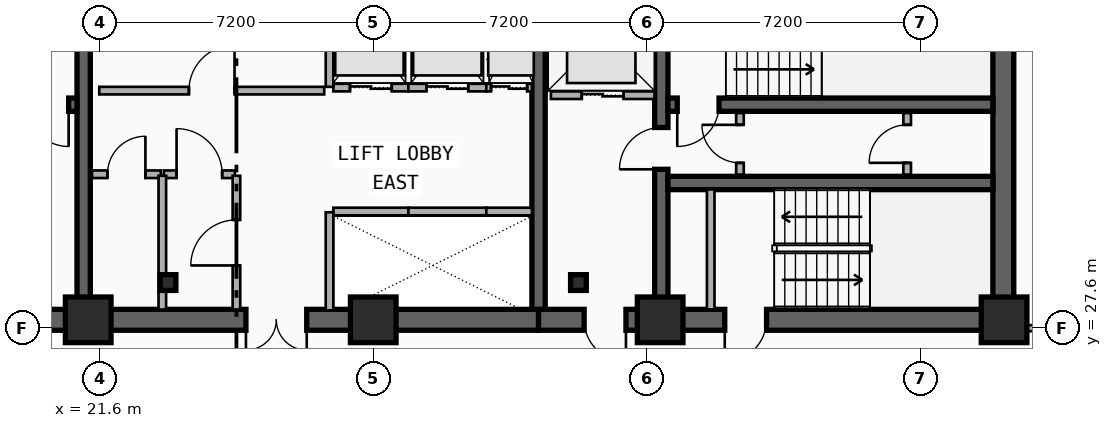
"""IFC4 building model, lengths in metres.
Left out: names, types, materials, properties, quantities, classifications, styles, units other than length and angle.
Written with IfcOpenShell. Run it as: python <this file> out.ifc"""

import sys

from ifc_helpers import new_model, si_unit, direction, frame, frame_2d, origin, origin_2d, place, context, subcontext, project, spatial, rectangle, i_section, extrude, element, fill, save


model = new_model("IFC4")
c1 = context("Model", 3, precision=1e-05, world=origin(), true_north=direction((0.0, 1.0)))
c2 = subcontext(c1, "Body", "Model", "MODEL_VIEW")
j1 = project(units=[si_unit("LENGTHUNIT", "METRE"), si_unit("PLANEANGLEUNIT", "RADIAN")], contexts=[c1])
p1 = place(None, origin())
s1 = spatial("IfcSite", under=j1, at=p1, CompositionType="ELEMENT")
p2 = place(p1, origin())
s2 = spatial("IfcBuilding", under=s1, at=p2, CompositionType="ELEMENT")
p3 = place(p2, frame((0.0, 0.0, 141.25)))
s3 = spatial("IfcBuildingStorey", under=s2, at=p3, CompositionType="ELEMENT", Elevation=141.25)
p4 = place(p3, frame((21.18, 27.82, 0.0), z_axis=(0.0, 0.0, 1.0), x_axis=(-1.0, 0.0, 0.0)))
e1 = element("IfcWall", 1, at=p4, inside=s3, PredefinedType="SHEAR", context=c2, shape_type="SweptSolid", body=[
    extrude(rectangle(XDim=9.03, YDim=0.55, at=frame_2d((4.515, 0.0))), origin(), (0.0, 0.0, 1.0), 3.55),
])
p5 = place(p4, frame((2.68, 0.0, 0.0)))
e2 = element("IfcOpeningElement", 2, at=p5, cuts=e1, PredefinedType="OPENING", context=c2, shape_type="SweptSolid", body=[
    extrude(rectangle(XDim=1.1, YDim=2.15, at=frame_2d((0.55, 1.075))), frame((0.0, 0.285, 0.0), z_axis=(0.0, -1.0, 0.0), x_axis=(1.0, 0.0, 0.0)), (0.0, 0.0, 1.0), 0.57),
])
p6 = place(p3, frame((33.15, 27.82, 0.0), z_axis=(0.0, 0.0, 1.0), x_axis=(-1.0, 0.0, 0.0)))
e3 = element("IfcWall", 3, at=p6, inside=s3, PredefinedType="SHEAR", context=c2, shape_type="SweptSolid", body=[
    extrude(rectangle(XDim=11.97, YDim=0.55, at=frame_2d((5.985, 0.0))), origin(), (0.0, 0.0, 1.0), 3.55),
])
p7 = place(p6, frame((6.1, 0.0, 0.0)))
e4 = element("IfcOpeningElement", 4, at=p7, cuts=e3, PredefinedType="OPENING", context=c2, shape_type="SweptSolid", body=[
    extrude(rectangle(XDim=1.6, YDim=2.2, at=frame_2d((0.8, 1.1))), frame((0.0, 0.285, 0.0), z_axis=(0.0, -1.0, 0.0), x_axis=(1.0, 0.0, 0.0)), (0.0, 0.0, 1.0), 0.57),
])
p8 = place(p3, frame((45.38, 27.82, 0.0), z_axis=(0.0, 0.0, 1.0), x_axis=(-1.0, 0.0, 0.0)))
e5 = element("IfcWall", 5, at=p8, inside=s3, PredefinedType="SHEAR", context=c2, shape_type="SweptSolid", body=[
    extrude(rectangle(XDim=12.23, YDim=0.55, at=frame_2d((6.115, 0.0))), origin(), (0.0, 0.0, 1.0), 3.55),
])
p9 = place(p8, frame((9.93, 0.0, 0.0)))
e6 = element("IfcOpeningElement", 6, at=p9, cuts=e5, PredefinedType="OPENING", context=c2, shape_type="SweptSolid", body=[
    extrude(rectangle(XDim=1.1, YDim=2.15, at=frame_2d((0.55, 1.075))), frame((0.0, 0.285, 0.0), z_axis=(0.0, -1.0, 0.0), x_axis=(1.0, 0.0, 0.0)), (0.0, 0.0, 1.0), 0.57),
])
p10 = place(p8, frame((6.23, 0.0, 0.0)))
e7 = element("IfcOpeningElement", 7, at=p10, cuts=e5, PredefinedType="OPENING", context=c2, shape_type="SweptSolid", body=[
    extrude(rectangle(XDim=1.1, YDim=2.15, at=frame_2d((0.55, 1.075))), frame((0.0, 0.285, 0.0), z_axis=(0.0, -1.0, 0.0), x_axis=(1.0, 0.0, 0.0)), (0.0, 0.0, 1.0), 0.57),
])
p11 = place(p3, frame((45.38, 28.095, 0.0), z_axis=(0.0, 0.0, 1.0), x_axis=(0.0, 1.0, 0.0)))
e8 = element("IfcWall", 8, at=p11, inside=s3, PredefinedType="SHEAR", context=c2, shape_type="SweptSolid", body=[
    extrude(rectangle(XDim=8.68, YDim=0.55, at=frame_2d((4.34, 0.0))), origin(), (0.0, 0.0, 1.0), 3.55),
])
for number, where, z_axis, x_axis in (
    (9, (21.18, 28.095, 0.0), (0.0, 0.0, 1.0), (0.0, 1.0, 0.0)),
    (10, (33.15, 28.095, 0.0), (0.0, 0.0, 1.0), (0.0, 1.0, 0.0)),
):
    element("IfcWall", number, at=place(p3, frame(where, z_axis=z_axis, x_axis=x_axis)), inside=s3, PredefinedType="SHEAR", context=c2, shape_type="SweptSolid", body=[
        extrude(rectangle(XDim=8.68, YDim=0.35, at=frame_2d((4.34, 0.0))), origin(), (0.0, 0.0, 1.0), 3.55),
    ])
p12 = place(p3, frame((36.38, 28.095, 0.0), z_axis=(0.0, 0.0, 1.0), x_axis=(0.0, 1.0, 0.0)))
e11 = element("IfcWall", 11, at=p12, inside=s3, PredefinedType="SHEAR", context=c2, shape_type="SweptSolid", body=[
    extrude(rectangle(XDim=8.68, YDim=0.35, at=frame_2d((4.34, 0.0))), origin(), (0.0, 0.0, 1.0), 3.55),
])
p13 = place(p12, frame((3.685, 0.0, 0.0)))
e12 = element("IfcOpeningElement", 12, at=p13, cuts=e11, PredefinedType="OPENING", context=c2, shape_type="SweptSolid", body=[
    extrude(rectangle(XDim=1.1, YDim=2.15, at=frame_2d((0.55, 1.075))), frame((0.0, 0.185, 0.0), z_axis=(0.0, -1.0, 0.0), x_axis=(1.0, 0.0, 0.0)), (0.0, 0.0, 1.0), 0.37),
])
p14 = place(p3, frame((21.005, 33.48, 0.0), z_axis=(0.0, 0.0, 1.0), x_axis=(-1.0, 0.0, 0.0)))
e13 = element("IfcWall", 13, at=p14, inside=s3, PredefinedType="SHEAR", context=c2, shape_type="SweptSolid", body=[
    extrude(rectangle(XDim=8.58, YDim=0.35, at=frame_2d((4.29, 0.0))), origin(), (0.0, 0.0, 1.0), 3.55),
])
p15 = place(p14, frame((0.22, 0.0, 0.0)))
e14 = element("IfcOpeningElement", 14, at=p15, cuts=e13, PredefinedType="OPENING", context=c2, shape_type="SweptSolid", body=[
    extrude(rectangle(XDim=1.1, YDim=2.15, at=frame_2d((0.55, 1.075))), frame((0.0, 0.185, 0.0), z_axis=(0.0, -1.0, 0.0), x_axis=(1.0, 0.0, 0.0)), (0.0, 0.0, 1.0), 0.37),
])
p16 = place(p3, frame((45.105, 33.48, 0.0), z_axis=(0.0, 0.0, 1.0), x_axis=(-1.0, 0.0, 0.0)))
e15 = element("IfcWall", 15, at=p16, inside=s3, PredefinedType="SHEAR", context=c2, shape_type="SweptSolid", body=[
    extrude(rectangle(XDim=8.55, YDim=0.35, at=frame_2d((4.275, 0.0))), origin(), (0.0, 0.0, 1.0), 3.55),
])
p17 = place(p16, frame((7.205, 0.0, 0.0)))
e16 = element("IfcOpeningElement", 16, at=p17, cuts=e15, PredefinedType="OPENING", context=c2, shape_type="SweptSolid", body=[
    extrude(rectangle(XDim=1.1, YDim=2.15, at=frame_2d((0.55, 1.075))), frame((0.0, 0.185, 0.0), z_axis=(0.0, -1.0, 0.0), x_axis=(1.0, 0.0, 0.0)), (0.0, 0.0, 1.0), 0.37),
])
p18 = place(p3, frame((36.555, 31.42, 0.0), z_axis=(0.0, 0.0, 1.0), x_axis=(1.0, 0.0, 0.0)))
e17 = element("IfcWall", 17, at=p18, inside=s3, PredefinedType="SHEAR", context=c2, shape_type="SweptSolid", body=[
    extrude(rectangle(XDim=8.55, YDim=0.35, at=frame_2d((4.275, 0.0))), origin(), (0.0, 0.0, 1.0), 3.55),
])
for number, where, z_axis, x_axis in (
    (18, (23.4, 28.8, 0.0), (0.0, 0.0, 1.0), (1.0, 0.0, 0.0)),
    (19, (34.2, 28.8, 0.0), (0.0, 0.0, 1.0), (1.0, 0.0, 0.0)),
):
    element("IfcColumn", number, at=place(p3, frame(where, z_axis=z_axis, x_axis=x_axis)), inside=s3, PredefinedType="COLUMN", context=c2, shape_type="SweptSolid", body=[
        extrude(i_section(OverallWidth=0.413, OverallDepth=0.415, WebThickness=0.03, FlangeThickness=0.047, FilletRadius=0.015, at=origin_2d()), origin(), (0.0, 0.0, 1.0), 3.55),
    ])
for number, where, z_axis, x_axis in (
    (20, (21.3, 27.82, 0.0), (0.0, 0.0, 1.0), (1.0, 0.0, 0.0)),
    (21, (28.8, 27.82, 0.0), (0.0, 0.0, 1.0), (1.0, 0.0, 0.0)),
    (22, (36.35, 27.82, 0.0), (0.0, 0.0, 1.0), (1.0, 0.0, 0.0)),
    (23, (45.4, 27.82, 0.0), (0.0, 0.0, 1.0), (1.0, 0.0, 0.0)),
):
    element("IfcColumn", number, at=place(p3, frame(where, z_axis=z_axis, x_axis=x_axis)), inside=s3, PredefinedType="COLUMN", context=c2, shape_type="SweptSolid", body=[
        extrude(rectangle(XDim=1.2, YDim=1.2, at=origin_2d()), origin(), (0.0, 0.0, 1.0), 3.55),
    ])
p19 = place(p3, frame((33.475, 33.73, 0.0), z_axis=(0.0, 0.0, 1.0), x_axis=(1.0, 0.0, 0.0)))
e24 = element("IfcWall", 24, at=p19, inside=s3, PredefinedType="PARTITIONING", context=c2, shape_type="SweptSolid", body=[
    extrude(rectangle(XDim=2.725, YDim=0.2, at=frame_2d((1.362, 0.0))), origin(), (0.0, 0.0, 1.0), 2.36),
])
p20 = place(p19, frame((0.812, 0.0, 0.0)))
e25 = element("IfcOpeningElement", 25, at=p20, cuts=e24, PredefinedType="OPENING", context=c2, shape_type="SweptSolid", body=[
    extrude(rectangle(XDim=1.1, YDim=2.15, at=frame_2d((0.55, 1.075))), frame((0.0, 0.11, 0.0), z_axis=(0.0, -1.0, 0.0), x_axis=(1.0, 0.0, 0.0)), (0.0, 0.0, 1.0), 0.22),
])
p21 = place(p3, frame((27.75, 30.67, 0.0), z_axis=(0.0, 0.0, 1.0), x_axis=(1.0, 0.0, 0.0)))
e26 = element("IfcWall", 26, at=p21, inside=s3, PredefinedType="PARTITIONING", context=c2, shape_type="SweptSolid", body=[
    extrude(rectangle(XDim=1.975, YDim=0.2, at=frame_2d((0.988, 0.0))), origin(), (0.0, 0.0, 1.0), 2.36),
])
p22 = place(p3, frame((27.65, 28.07, 0.0), z_axis=(0.0, 0.0, 1.0), x_axis=(0.0, 1.0, 0.0)))
e27 = element("IfcWall", 27, at=p22, inside=s3, PredefinedType="PARTITIONING", context=c2, shape_type="SweptSolid", body=[
    extrude(rectangle(XDim=2.58, YDim=0.2, at=frame_2d((1.29, 0.0))), origin(), (0.0, 0.0, 1.0), 2.36),
])
p23 = place(p3, frame((29.725, 30.67, 0.0), z_axis=(0.0, 0.0, 1.0), x_axis=(1.0, 0.0, 0.0)))
e28 = element("IfcWall", 28, at=p23, inside=s3, PredefinedType="PARTITIONING", context=c2, shape_type="SweptSolid", body=[
    extrude(rectangle(XDim=2.05, YDim=0.2, at=frame_2d((1.025, 0.0))), origin(), (0.0, 0.0, 1.0), 2.67),
])
p24 = place(p3, frame((31.775, 30.67, 0.0), z_axis=(0.0, 0.0, 1.0), x_axis=(1.0, 0.0, 0.0)))
e29 = element("IfcWall", 29, at=p24, inside=s3, PredefinedType="PARTITIONING", context=c2, shape_type="SweptSolid", body=[
    extrude(rectangle(XDim=1.2, YDim=0.2, at=frame_2d((0.6, 0.0))), origin(), (0.0, 0.0, 1.0), 2.67),
])
p25 = place(p3, frame((27.75, 33.93, 0.0), z_axis=(0.0, 0.0, 1.0), x_axis=(1.0, 0.0, 0.0)))
e30 = element("IfcWall", 30, at=p25, inside=s3, PredefinedType="PARTITIONING", context=c2, shape_type="SweptSolid", body=[
    extrude(rectangle(XDim=1.975, YDim=0.2, at=frame_2d((0.988, 0.0))), origin(), (0.0, 0.0, 1.0), 2.36),
])
p26 = place(p25, frame((0.438, 0.0, 0.0)))
e31 = element("IfcOpeningElement", 31, at=p26, cuts=e30, PredefinedType="OPENING", context=c2, shape_type="SweptSolid", body=[
    extrude(rectangle(XDim=1.1, YDim=2.15, at=frame_2d((0.55, 1.075))), frame((0.0, 0.11, 0.0), z_axis=(0.0, -1.0, 0.0), x_axis=(1.0, 0.0, 0.0)), (0.0, 0.0, 1.0), 0.22),
])
p27 = place(p3, frame((27.65, 33.95, 0.0), z_axis=(0.0, 0.0, 1.0), x_axis=(0.0, 1.0, 0.0)))
e32 = element("IfcWall", 32, at=p27, inside=s3, PredefinedType="PARTITIONING", context=c2, shape_type="SweptSolid", body=[
    extrude(rectangle(XDim=2.68, YDim=0.2, at=frame_2d((1.34, 0.0))), origin(), (0.0, 0.0, 1.0), 2.36),
])
p28 = place(p3, frame((29.725, 33.93, 0.0), z_axis=(0.0, 0.0, 1.0), x_axis=(1.0, 0.0, 0.0)))
e33 = element("IfcWall", 33, at=p28, inside=s3, PredefinedType="PARTITIONING", context=c2, shape_type="SweptSolid", body=[
    extrude(rectangle(XDim=2.05, YDim=0.2, at=frame_2d((1.025, 0.0))), origin(), (0.0, 0.0, 1.0), 3.29),
])
p29 = place(p28, frame((0.475, 0.0, 0.0)))
e34 = element("IfcOpeningElement", 34, at=p29, cuts=e33, PredefinedType="OPENING", context=c2, shape_type="SweptSolid", body=[
    extrude(rectangle(XDim=1.1, YDim=2.15, at=frame_2d((0.55, 1.075))), frame((0.0, 0.11, 0.0), z_axis=(0.0, -1.0, 0.0), x_axis=(1.0, 0.0, 0.0)), (0.0, 0.0, 1.0), 0.22),
])
p30 = place(p3, frame((31.775, 33.93, 0.0), z_axis=(0.0, 0.0, 1.0), x_axis=(1.0, 0.0, 0.0)))
e35 = element("IfcWall", 35, at=p30, inside=s3, PredefinedType="PARTITIONING", context=c2, shape_type="SweptSolid", body=[
    extrude(rectangle(XDim=1.2, YDim=0.2, at=frame_2d((0.6, 0.0))), origin(), (0.0, 0.0, 1.0), 3.29),
])
p31 = place(p30, frame((0.125, 0.0, 0.0)))
e36 = element("IfcOpeningElement", 36, at=p31, cuts=e35, PredefinedType="OPENING", context=c2, shape_type="SweptSolid", body=[
    extrude(rectangle(XDim=0.95, YDim=2.15, at=frame_2d((0.475, 1.075))), frame((0.0, 0.11, 0.0), z_axis=(0.0, -1.0, 0.0), x_axis=(1.0, 0.0, 0.0)), (0.0, 0.0, 1.0), 0.22),
])
p32 = place(p3, frame((37.68, 28.095, 0.0), z_axis=(0.0, 0.0, 1.0), x_axis=(0.0, 1.0, 0.0)))
e37 = element("IfcWall", 37, at=p32, inside=s3, PredefinedType="PARTITIONING", context=c2, shape_type="SweptSolid", body=[
    extrude(rectangle(XDim=3.155, YDim=0.2, at=frame_2d((1.578, 0.0))), origin(), (0.0, 0.0, 1.0), 2.67),
])
p33 = place(p3, frame((38.45, 31.64, 0.0), z_axis=(0.0, 0.0, 1.0), x_axis=(0.0, 1.0, 0.0)))
e38 = element("IfcWall", 38, at=p33, inside=s3, PredefinedType="PARTITIONING", context=c2, shape_type="SweptSolid", body=[
    extrude(rectangle(XDim=1.62, YDim=0.2, at=frame_2d((0.81, 0.0))), origin(), (0.0, 0.0, 1.0), 3.29),
])
p34 = place(p33, frame((0.31, 0.0, 0.0)))
e39 = element("IfcOpeningElement", 39, at=p34, cuts=e38, PredefinedType="OPENING", context=c2, shape_type="SweptSolid", body=[
    extrude(rectangle(XDim=1.0, YDim=2.15, at=frame_2d((0.5, 1.075))), frame((0.0, 0.11, 0.0), z_axis=(0.0, -1.0, 0.0), x_axis=(1.0, 0.0, 0.0)), (0.0, 0.0, 1.0), 0.22),
])
p35 = place(p3, frame((42.85, 31.64, 0.0), z_axis=(0.0, 0.0, 1.0), x_axis=(0.0, 1.0, 0.0)))
e40 = element("IfcWall", 40, at=p35, inside=s3, PredefinedType="PARTITIONING", context=c2, shape_type="SweptSolid", body=[
    extrude(rectangle(XDim=1.62, YDim=0.2, at=frame_2d((0.81, 0.0))), origin(), (0.0, 0.0, 1.0), 3.29),
])
p36 = place(p35, frame((0.31, 0.0, 0.0)))
e41 = element("IfcOpeningElement", 41, at=p36, cuts=e40, PredefinedType="OPENING", context=c2, shape_type="SweptSolid", body=[
    extrude(rectangle(XDim=1.0, YDim=2.15, at=frame_2d((0.5, 1.075))), frame((0.0, 0.11, 0.0), z_axis=(0.0, -1.0, 0.0), x_axis=(1.0, 0.0, 0.0)), (0.0, 0.0, 1.0), 0.22),
])
p37 = place(p3, frame((21.4, 31.65, 0.0), z_axis=(0.0, 0.0, 1.0), x_axis=(1.0, 0.0, 0.0)))
e42 = element("IfcWall", 42, at=p37, inside=s3, PredefinedType="PARTITIONING", context=c2, shape_type="SweptSolid", body=[
    extrude(rectangle(XDim=1.81, YDim=0.2, at=frame_2d((0.905, 0.0))), origin(), (0.0, 0.0, 1.0), 2.36),
])
p38 = place(p37, frame((0.405, 0.0, 0.0)))
e43 = element("IfcOpeningElement", 43, at=p38, cuts=e42, PredefinedType="OPENING", context=c2, shape_type="SweptSolid", body=[
    extrude(rectangle(XDim=1.0, YDim=2.15, at=frame_2d((0.5, 1.075))), frame((0.0, 0.11, 0.0), z_axis=(0.0, -1.0, 0.0), x_axis=(1.0, 0.0, 0.0)), (0.0, 0.0, 1.0), 0.22),
])
p39 = place(p3, frame((23.29, 31.65, 0.0), z_axis=(0.0, 0.0, 1.0), x_axis=(1.0, 0.0, 0.0)))
e44 = element("IfcWall", 44, at=p39, inside=s3, PredefinedType="PARTITIONING", context=c2, shape_type="SweptSolid", body=[
    extrude(rectangle(XDim=1.87, YDim=0.2, at=frame_2d((0.935, 0.0))), origin(), (0.0, 0.0, 1.0), 3.29),
])
p40 = place(p39, frame((0.335, 0.0, 0.0)))
e45 = element("IfcOpeningElement", 45, at=p40, cuts=e44, PredefinedType="OPENING", context=c2, shape_type="SweptSolid", body=[
    extrude(rectangle(XDim=1.2, YDim=2.15, at=frame_2d((0.6, 1.075))), frame((0.0, 0.11, 0.0), z_axis=(0.0, -1.0, 0.0), x_axis=(1.0, 0.0, 0.0)), (0.0, 0.0, 1.0), 0.22),
])
p41 = place(p3, frame((21.59, 33.85, 0.0), z_axis=(0.0, 0.0, 1.0), x_axis=(1.0, 0.0, 0.0)))
e46 = element("IfcWall", 46, at=p41, inside=s3, PredefinedType="PARTITIONING", context=c2, shape_type="SweptSolid", body=[
    extrude(rectangle(XDim=5.92, YDim=0.2, at=frame_2d((2.96, 0.0))), origin(), (0.0, 0.0, 1.0), 2.36),
])
p42 = place(p41, frame((2.36, 0.0, 0.0)))
e47 = element("IfcOpeningElement", 47, at=p42, cuts=e46, PredefinedType="OPENING", context=c2, shape_type="SweptSolid", body=[
    extrude(rectangle(XDim=1.2, YDim=2.15, at=frame_2d((0.6, 1.075))), frame((0.0, 0.11, 0.0), z_axis=(0.0, -1.0, 0.0), x_axis=(1.0, 0.0, 0.0)), (0.0, 0.0, 1.0), 0.22),
])
p43 = place(p3, frame((25.2, 28.09, 0.0), z_axis=(0.0, 0.0, 1.0), x_axis=(0.0, 1.0, 0.0)))
e48 = element("IfcWall", 48, at=p43, inside=s3, PredefinedType="PARTITIONING", context=c2, shape_type="SweptSolid", body=[
    extrude(rectangle(XDim=3.52, YDim=0.2, at=frame_2d((1.76, 0.0))), origin(), (0.0, 0.0, 1.0), 2.67),
])
p44 = place(p43, frame((1.16, 0.0, 0.0)))
e49 = element("IfcOpeningElement", 49, at=p44, cuts=e48, PredefinedType="OPENING", context=c2, shape_type="SweptSolid", body=[
    extrude(rectangle(XDim=1.2, YDim=2.15, at=frame_2d((0.6, 1.075))), frame((0.0, 0.11, 0.0), z_axis=(0.0, -1.0, 0.0), x_axis=(1.0, 0.0, 0.0)), (0.0, 0.0, 1.0), 0.22),
])
p45 = place(p3, frame((23.25, 28.09, 0.0), z_axis=(0.0, 0.0, 1.0), x_axis=(0.0, 1.0, 0.0)))
e50 = element("IfcWall", 50, at=p45, inside=s3, PredefinedType="PARTITIONING", context=c2, shape_type="SweptSolid", body=[
    extrude(rectangle(XDim=3.52, YDim=0.2, at=frame_2d((1.76, 0.0))), origin(), (0.0, 0.0, 1.0), 2.67),
])
p46 = place(p3, frame((45.41, 27.6, 0.0), z_axis=(0.0, 0.0, 1.0), x_axis=(1.0, 0.0, 0.0)))
e51 = element("IfcWall", 51, at=p46, inside=s3, PredefinedType="PARTITIONING", context=c2, shape_type="SweptSolid", body=[
    extrude(rectangle(XDim=0.91, YDim=0.16, at=frame_2d((0.455, 0.0))), origin(), (0.0, 0.0, 1.0), 2.36),
])
p47 = place(p20, origin())
e52 = element("IfcDoor", 52, at=p47, inside=s3, OperationType="DOUBLE_DOOR_SLIDING", PredefinedType="DOOR", context=c2, shape_type="SweptSolid", body=[
    extrude(rectangle(XDim=1.1, YDim=2.15, at=frame_2d((0.55, 1.075))), frame((0.0, 0.025, 0.0), z_axis=(0.0, -1.0, 0.0), x_axis=(1.0, 0.0, 0.0)), (0.0, 0.0, 1.0), 0.05),
])
fill(e25, e52)
p48 = place(p26, origin())
e53 = element("IfcDoor", 53, at=p48, inside=s3, OperationType="DOUBLE_DOOR_SLIDING", PredefinedType="DOOR", context=c2, shape_type="SweptSolid", body=[
    extrude(rectangle(XDim=1.1, YDim=2.15, at=frame_2d((0.55, 1.075))), frame((0.0, 0.025, 0.0), z_axis=(0.0, -1.0, 0.0), x_axis=(1.0, 0.0, 0.0)), (0.0, 0.0, 1.0), 0.05),
])
fill(e31, e53)
p49 = place(p29, origin())
e54 = element("IfcDoor", 54, at=p49, inside=s3, OperationType="DOUBLE_DOOR_SLIDING", PredefinedType="DOOR", context=c2, shape_type="SweptSolid", body=[
    extrude(rectangle(XDim=1.1, YDim=2.15, at=frame_2d((0.55, 1.075))), frame((0.0, 0.025, 0.0), z_axis=(0.0, -1.0, 0.0), x_axis=(1.0, 0.0, 0.0)), (0.0, 0.0, 1.0), 0.05),
])
fill(e34, e54)
p50 = place(p31, origin())
e55 = element("IfcDoor", 55, at=p50, inside=s3, OperationType="DOUBLE_DOOR_SLIDING", PredefinedType="DOOR", context=c2, shape_type="SweptSolid", body=[
    extrude(rectangle(XDim=0.95, YDim=2.15, at=frame_2d((0.475, 1.075))), frame((0.0, 0.025, 0.0), z_axis=(0.0, -1.0, 0.0), x_axis=(1.0, 0.0, 0.0)), (0.0, 0.0, 1.0), 0.05),
])
fill(e36, e55)
p51 = place(p15, origin())
e56 = element("IfcDoor", 56, at=p51, inside=s3, OperationType="SINGLE_SWING_LEFT", PredefinedType="DOOR", context=c2, shape_type="SweptSolid", body=[
    extrude(rectangle(XDim=1.1, YDim=2.15, at=frame_2d((0.55, 1.075))), frame((0.0, 0.025, 0.0), z_axis=(0.0, -1.0, 0.0), x_axis=(1.0, 0.0, 0.0)), (0.0, 0.0, 1.0), 0.05),
])
fill(e14, e56)
p52 = place(p17, origin())
e57 = element("IfcDoor", 57, at=p52, inside=s3, OperationType="SINGLE_SWING_RIGHT", PredefinedType="DOOR", context=c2, shape_type="SweptSolid", body=[
    extrude(rectangle(XDim=1.1, YDim=2.15, at=frame_2d((0.55, 1.075))), frame((0.0, 0.025, 0.0), z_axis=(0.0, -1.0, 0.0), x_axis=(1.0, 0.0, 0.0)), (0.0, 0.0, 1.0), 0.05),
])
fill(e16, e57)
p53 = place(p13, origin())
e58 = element("IfcDoor", 58, at=p53, inside=s3, OperationType="SINGLE_SWING_LEFT", PredefinedType="DOOR", context=c2, shape_type="SweptSolid", body=[
    extrude(rectangle(XDim=1.1, YDim=2.15, at=frame_2d((0.55, 1.075))), frame((0.0, 0.025, 0.0), z_axis=(0.0, -1.0, 0.0), x_axis=(1.0, 0.0, 0.0)), (0.0, 0.0, 1.0), 0.05),
])
fill(e12, e58)
p54 = place(p9, origin())
e59 = element("IfcDoor", 59, at=p54, inside=s3, OperationType="SINGLE_SWING_LEFT", PredefinedType="DOOR", context=c2, shape_type="SweptSolid", body=[
    extrude(rectangle(XDim=1.1, YDim=2.15, at=frame_2d((0.55, 1.075))), frame((0.0, 0.025, 0.0), z_axis=(0.0, -1.0, 0.0), x_axis=(1.0, 0.0, 0.0)), (0.0, 0.0, 1.0), 0.05),
])
fill(e6, e59)
p55 = place(p10, origin())
e60 = element("IfcDoor", 60, at=p55, inside=s3, OperationType="SINGLE_SWING_RIGHT", PredefinedType="DOOR", context=c2, shape_type="SweptSolid", body=[
    extrude(rectangle(XDim=1.1, YDim=2.15, at=frame_2d((0.55, 1.075))), frame((0.0, 0.025, 0.0), z_axis=(0.0, -1.0, 0.0), x_axis=(1.0, 0.0, 0.0)), (0.0, 0.0, 1.0), 0.05),
])
fill(e7, e60)
p56 = place(p7, origin())
e61 = element("IfcDoor", 61, at=p56, inside=s3, OperationType="SINGLE_SWING_LEFT", PredefinedType="DOOR", context=c2, shape_type="SweptSolid", body=[
    extrude(rectangle(XDim=1.6, YDim=2.2, at=frame_2d((0.8, 1.1))), frame((0.0, 0.025, 0.0), z_axis=(0.0, -1.0, 0.0), x_axis=(1.0, 0.0, 0.0)), (0.0, 0.0, 1.0), 0.05),
])
fill(e4, e61)
p57 = place(p34, origin())
e62 = element("IfcDoor", 62, at=p57, inside=s3, OperationType="SINGLE_SWING_RIGHT", PredefinedType="DOOR", context=c2, shape_type="SweptSolid", body=[
    extrude(rectangle(XDim=1.0, YDim=2.15, at=frame_2d((0.5, 1.075))), frame((0.0, 0.025, 0.0), z_axis=(0.0, -1.0, 0.0), x_axis=(1.0, 0.0, 0.0)), (0.0, 0.0, 1.0), 0.05),
])
fill(e39, e62)
p58 = place(p36, origin())
e63 = element("IfcDoor", 63, at=p58, inside=s3, OperationType="SINGLE_SWING_LEFT", PredefinedType="DOOR", context=c2, shape_type="SweptSolid", body=[
    extrude(rectangle(XDim=1.0, YDim=2.15, at=frame_2d((0.5, 1.075))), frame((0.0, 0.025, 0.0), z_axis=(0.0, -1.0, 0.0), x_axis=(1.0, 0.0, 0.0)), (0.0, 0.0, 1.0), 0.05),
])
fill(e41, e63)
p59 = place(p38, origin())
e64 = element("IfcDoor", 64, at=p59, inside=s3, OperationType="SINGLE_SWING_RIGHT", PredefinedType="DOOR", context=c2, shape_type="SweptSolid", body=[
    extrude(rectangle(XDim=1.0, YDim=2.15, at=frame_2d((0.5, 1.075))), frame((0.0, 0.025, 0.0), z_axis=(0.0, -1.0, 0.0), x_axis=(1.0, 0.0, 0.0)), (0.0, 0.0, 1.0), 0.05),
])
fill(e43, e64)
p60 = place(p40, origin())
e65 = element("IfcDoor", 65, at=p60, inside=s3, OperationType="SINGLE_SWING_LEFT", PredefinedType="DOOR", context=c2, shape_type="SweptSolid", body=[
    extrude(rectangle(XDim=1.2, YDim=2.15, at=frame_2d((0.6, 1.075))), frame((0.0, 0.025, 0.0), z_axis=(0.0, -1.0, 0.0), x_axis=(1.0, 0.0, 0.0)), (0.0, 0.0, 1.0), 0.05),
])
fill(e45, e65)
p61 = place(p42, origin())
e66 = element("IfcDoor", 66, at=p61, inside=s3, OperationType="SINGLE_SWING_RIGHT", PredefinedType="DOOR", context=c2, shape_type="SweptSolid", body=[
    extrude(rectangle(XDim=1.2, YDim=2.15, at=frame_2d((0.6, 1.075))), frame((0.0, 0.025, 0.0), z_axis=(0.0, -1.0, 0.0), x_axis=(1.0, 0.0, 0.0)), (0.0, 0.0, 1.0), 0.05),
])
fill(e47, e66)
p62 = place(p44, origin())
e67 = element("IfcDoor", 67, at=p62, inside=s3, OperationType="SINGLE_SWING_LEFT", PredefinedType="DOOR", context=c2, shape_type="SweptSolid", body=[
    extrude(rectangle(XDim=1.2, YDim=2.15, at=frame_2d((0.6, 1.075))), frame((0.0, 0.025, 0.0), z_axis=(0.0, -1.0, 0.0), x_axis=(1.0, 0.0, 0.0)), (0.0, 0.0, 1.0), 0.05),
])
fill(e49, e67)
save(model, sys.argv[1])
